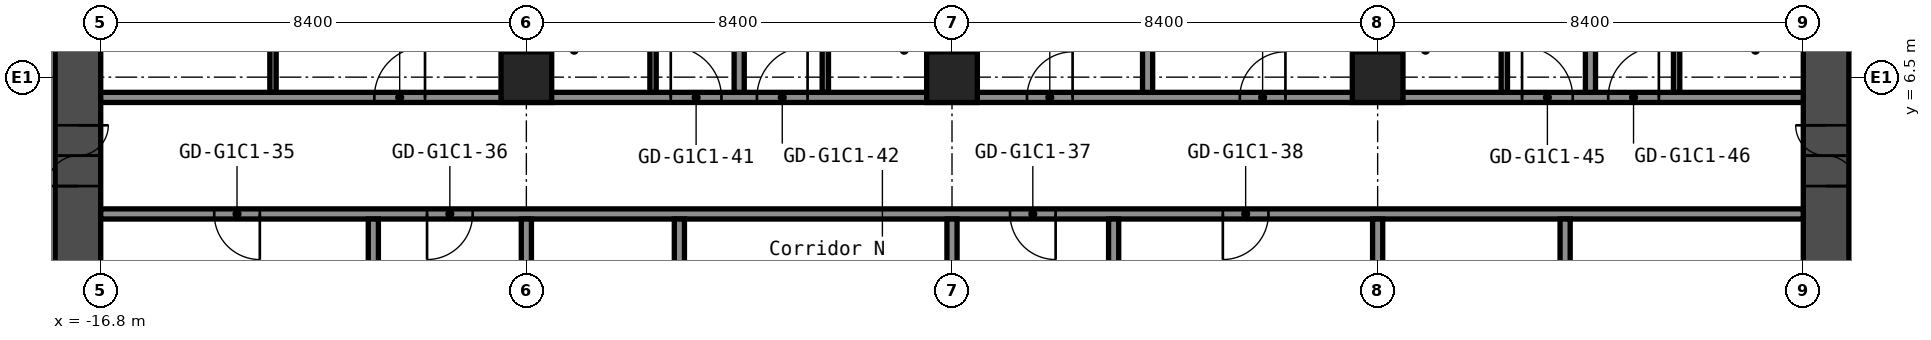
"""IFC4 building model, lengths in metres.
Left out: names, types, materials, properties, quantities, classifications, styles, units other than length and angle.
Written with IfcOpenShell. Run it as: python <this file> out.ifc"""

import sys

from ifc_helpers import new_model, si_unit, direction, frame, frame_2d, origin, origin_2d, place, context, subcontext, project, spatial, rectangle, hollow_rectangle, extrude, element, fill, save


model = new_model("IFC4")
c1 = context("Model", 3, precision=1e-05, world=origin(), true_north=direction((0.0, 1.0)))
c2 = subcontext(c1, "Body", "Model", "MODEL_VIEW")
j1 = project(units=[si_unit("LENGTHUNIT", "METRE"), si_unit("PLANEANGLEUNIT", "RADIAN")], contexts=[c1])
p1 = place(None, origin())
s1 = spatial("IfcSite", under=j1, at=p1, CompositionType="ELEMENT")
p2 = place(p1, origin())
s2 = spatial("IfcBuilding", under=s1, at=p2, CompositionType="ELEMENT")
p3 = place(p2, frame((0.0, 0.0, 42.2)))
s3 = spatial("IfcBuildingStorey", under=s2, at=p3, CompositionType="ELEMENT", Elevation=42.2)
for number, where, z_axis, x_axis in (
    (1, (-8.4, 6.5, 0.0), (0.0, 0.0, 1.0), (1.0, 0.0, 0.0)),
    (2, (0.0, 6.5, 0.0), (0.0, 0.0, 1.0), (1.0, 0.0, 0.0)),
    (3, (8.4, 6.5, 0.0), (0.0, 0.0, 1.0), (1.0, 0.0, 0.0)),
):
    element("IfcColumn", number, at=place(p3, frame(where, z_axis=z_axis, x_axis=x_axis)), inside=s3, PredefinedType="COLUMN", context=c2, shape_type="SweptSolid", body=[
        extrude(hollow_rectangle(XDim=1.0, YDim=1.0, WallThickness=0.04, at=origin_2d()), origin(), (0.0, 0.0, 1.0), 2.8),
    ])
p4 = place(p3, frame((-17.25, -8.4, 0.0), z_axis=(0.0, 0.0, 1.0), x_axis=(0.0, 1.0, 0.0)))
e4 = element("IfcWall", 4, at=p4, inside=s3, PredefinedType="SHEAR", context=c2, shape_type="SweptSolid", body=[
    extrude(rectangle(XDim=16.8, YDim=0.9, at=frame_2d((8.4, 0.0))), origin(), (0.0, 0.0, 1.0), 2.8),
])
p5 = place(p4, frame((12.75, 0.0, 0.0)))
e5 = element("IfcOpeningElement", 5, at=p5, cuts=e4, PredefinedType="OPENING", context=c2, shape_type="SweptSolid", body=[
    extrude(rectangle(XDim=1.2, YDim=2.1, at=frame_2d((0.6, 1.05))), frame((0.0, 0.46, 0.0), z_axis=(0.0, -1.0, 0.0), x_axis=(1.0, 0.0, 0.0)), (0.0, 0.0, 1.0), 0.92),
])
p6 = place(p4, frame((2.85, 0.0, 0.0)))
e6 = element("IfcOpeningElement", 6, at=p6, cuts=e4, PredefinedType="OPENING", context=c2, shape_type="SweptSolid", body=[
    extrude(rectangle(XDim=1.2, YDim=2.1, at=frame_2d((0.6, 1.05))), frame((0.0, 0.46, 0.0), z_axis=(0.0, -1.0, 0.0), x_axis=(1.0, 0.0, 0.0)), (0.0, 0.0, 1.0), 0.92),
])
p7 = place(p3, frame((17.25, -8.4, 0.0), z_axis=(0.0, 0.0, 1.0), x_axis=(0.0, 1.0, 0.0)))
e7 = element("IfcWall", 7, at=p7, inside=s3, PredefinedType="SHEAR", context=c2, shape_type="SweptSolid", body=[
    extrude(rectangle(XDim=16.8, YDim=0.9, at=frame_2d((8.4, 0.0))), origin(), (0.0, 0.0, 1.0), 2.8),
])
p8 = place(p7, frame((12.75, 0.0, 0.0)))
e8 = element("IfcOpeningElement", 8, at=p8, cuts=e7, PredefinedType="OPENING", context=c2, shape_type="SweptSolid", body=[
    extrude(rectangle(XDim=1.2, YDim=2.1, at=frame_2d((0.6, 1.05))), frame((0.0, 0.46, 0.0), z_axis=(0.0, -1.0, 0.0), x_axis=(1.0, 0.0, 0.0)), (0.0, 0.0, 1.0), 0.92),
])
p9 = place(p7, frame((2.85, 0.0, 0.0)))
e9 = element("IfcOpeningElement", 9, at=p9, cuts=e7, PredefinedType="OPENING", context=c2, shape_type="SweptSolid", body=[
    extrude(rectangle(XDim=1.2, YDim=2.1, at=frame_2d((0.6, 1.05))), frame((0.0, 0.46, 0.0), z_axis=(0.0, -1.0, 0.0), x_axis=(1.0, 0.0, 0.0)), (0.0, 0.0, 1.0), 0.92),
])
p10 = place(p3, frame((-16.8, 3.8, 0.0), z_axis=(0.0, 0.0, 1.0), x_axis=(1.0, 0.0, 0.0)))
e10 = element("IfcWall", 10, at=p10, inside=s3, PredefinedType="PARTITIONING", context=c2, shape_type="SweptSolid", body=[
    extrude(rectangle(XDim=33.6, YDim=0.2, at=frame_2d((16.8, 0.0))), origin(), (0.0, 0.0, 1.0), 2.8),
])
p11 = place(p10, frame((2.24, 0.0, 0.0)))
e11 = element("IfcOpeningElement", 11, at=p11, cuts=e10, PredefinedType="OPENING", context=c2, shape_type="SweptSolid", body=[
    extrude(rectangle(XDim=0.9, YDim=2.1, at=frame_2d((0.45, 1.05))), frame((0.0, 0.11, 0.0), z_axis=(0.0, -1.0, 0.0), x_axis=(1.0, 0.0, 0.0)), (0.0, 0.0, 1.0), 0.22),
])
p12 = place(p10, frame((6.44, 0.0, 0.0)))
e12 = element("IfcOpeningElement", 12, at=p12, cuts=e10, PredefinedType="OPENING", context=c2, shape_type="SweptSolid", body=[
    extrude(rectangle(XDim=0.9, YDim=2.1, at=frame_2d((0.45, 1.05))), frame((0.0, 0.11, 0.0), z_axis=(0.0, -1.0, 0.0), x_axis=(1.0, 0.0, 0.0)), (0.0, 0.0, 1.0), 0.22),
])
p13 = place(p10, frame((17.945, 0.0, 0.0)))
e13 = element("IfcOpeningElement", 13, at=p13, cuts=e10, PredefinedType="OPENING", context=c2, shape_type="SweptSolid", body=[
    extrude(rectangle(XDim=0.9, YDim=2.1, at=frame_2d((0.45, 1.05))), frame((0.0, 0.11, 0.0), z_axis=(0.0, -1.0, 0.0), x_axis=(1.0, 0.0, 0.0)), (0.0, 0.0, 1.0), 0.22),
])
p14 = place(p10, frame((22.145, 0.0, 0.0)))
e14 = element("IfcOpeningElement", 14, at=p14, cuts=e10, PredefinedType="OPENING", context=c2, shape_type="SweptSolid", body=[
    extrude(rectangle(XDim=0.9, YDim=2.1, at=frame_2d((0.45, 1.05))), frame((0.0, 0.11, 0.0), z_axis=(0.0, -1.0, 0.0), x_axis=(1.0, 0.0, 0.0)), (0.0, 0.0, 1.0), 0.22),
])
p15 = place(p3, frame((-16.8, 6.1, 0.0), z_axis=(0.0, 0.0, 1.0), x_axis=(1.0, 0.0, 0.0)))
e15 = element("IfcWall", 15, at=p15, inside=s3, PredefinedType="PARTITIONING", context=c2, shape_type="SweptSolid", body=[
    extrude(rectangle(XDim=33.6, YDim=0.2, at=frame_2d((16.8, 0.0))), origin(), (0.0, 0.0, 1.0), 2.8),
])
p16 = place(p15, frame((5.4, 0.0, 0.0)))
e16 = element("IfcOpeningElement", 16, at=p16, cuts=e15, PredefinedType="OPENING", context=c2, shape_type="SweptSolid", body=[
    extrude(rectangle(XDim=1.0, YDim=2.1, at=frame_2d((0.5, 1.05))), frame((0.0, 0.11, 0.0), z_axis=(0.0, -1.0, 0.0), x_axis=(1.0, 0.0, 0.0)), (0.0, 0.0, 1.0), 0.22),
])
p17 = place(p15, frame((11.25, 0.0, 0.0)))
e17 = element("IfcOpeningElement", 17, at=p17, cuts=e15, PredefinedType="OPENING", context=c2, shape_type="SweptSolid", body=[
    extrude(rectangle(XDim=1.0, YDim=2.1, at=frame_2d((0.5, 1.05))), frame((0.0, 0.11, 0.0), z_axis=(0.0, -1.0, 0.0), x_axis=(1.0, 0.0, 0.0)), (0.0, 0.0, 1.0), 0.22),
])
p18 = place(p15, frame((12.95, 0.0, 0.0)))
e18 = element("IfcOpeningElement", 18, at=p18, cuts=e15, PredefinedType="OPENING", context=c2, shape_type="SweptSolid", body=[
    extrude(rectangle(XDim=1.0, YDim=2.1, at=frame_2d((0.5, 1.05))), frame((0.0, 0.11, 0.0), z_axis=(0.0, -1.0, 0.0), x_axis=(1.0, 0.0, 0.0)), (0.0, 0.0, 1.0), 0.22),
])
p19 = place(p15, frame((18.28, 0.0, 0.0)))
e19 = element("IfcOpeningElement", 19, at=p19, cuts=e15, PredefinedType="OPENING", context=c2, shape_type="SweptSolid", body=[
    extrude(rectangle(XDim=0.9, YDim=2.1, at=frame_2d((0.45, 1.05))), frame((0.0, 0.11, 0.0), z_axis=(0.0, -1.0, 0.0), x_axis=(1.0, 0.0, 0.0)), (0.0, 0.0, 1.0), 0.22),
])
p20 = place(p15, frame((22.48, 0.0, 0.0)))
e20 = element("IfcOpeningElement", 20, at=p20, cuts=e15, PredefinedType="OPENING", context=c2, shape_type="SweptSolid", body=[
    extrude(rectangle(XDim=0.9, YDim=2.1, at=frame_2d((0.45, 1.05))), frame((0.0, 0.11, 0.0), z_axis=(0.0, -1.0, 0.0), x_axis=(1.0, 0.0, 0.0)), (0.0, 0.0, 1.0), 0.22),
])
p21 = place(p15, frame((28.05, 0.0, 0.0)))
e21 = element("IfcOpeningElement", 21, at=p21, cuts=e15, PredefinedType="OPENING", context=c2, shape_type="SweptSolid", body=[
    extrude(rectangle(XDim=1.0, YDim=2.1, at=frame_2d((0.5, 1.05))), frame((0.0, 0.11, 0.0), z_axis=(0.0, -1.0, 0.0), x_axis=(1.0, 0.0, 0.0)), (0.0, 0.0, 1.0), 0.22),
])
p22 = place(p15, frame((29.75, 0.0, 0.0)))
e22 = element("IfcOpeningElement", 22, at=p22, cuts=e15, PredefinedType="OPENING", context=c2, shape_type="SweptSolid", body=[
    extrude(rectangle(XDim=1.0, YDim=2.1, at=frame_2d((0.5, 1.05))), frame((0.0, 0.11, 0.0), z_axis=(0.0, -1.0, 0.0), x_axis=(1.0, 0.0, 0.0)), (0.0, 0.0, 1.0), 0.22),
])
p23 = place(p3, frame((-13.4, 6.2, 0.0), z_axis=(0.0, 0.0, 1.0), x_axis=(0.0, 1.0, 0.0)))
e23 = element("IfcWall", 23, at=p23, inside=s3, PredefinedType="PARTITIONING", context=c2, shape_type="SweptSolid", body=[
    extrude(rectangle(XDim=3.3, YDim=0.125, at=frame_2d((1.65, 0.0))), origin(), (0.0, 0.0, 1.0), 2.8),
])
for number, where, z_axis, x_axis in (
    (24, (-11.42, -3.7, 0.0), (0.0, 0.0, 1.0), (0.0, 1.0, 0.0)),
    (25, (-8.4, -3.7, 0.0), (0.0, 0.0, 1.0), (0.0, 1.0, 0.0)),
):
    element("IfcWall", number, at=place(p3, frame(where, z_axis=z_axis, x_axis=x_axis)), inside=s3, PredefinedType="PARTITIONING", context=c2, shape_type="SweptSolid", body=[
        extrude(rectangle(XDim=7.4, YDim=0.2, at=frame_2d((3.7, 0.0))), origin(), (0.0, 0.0, 1.0), 2.8),
    ])
p24 = place(p3, frame((-8.4, 6.99, 0.0), z_axis=(0.0, 0.0, 1.0), x_axis=(0.0, 1.0, 0.0)))
e26 = element("IfcWall", 26, at=p24, inside=s3, PredefinedType="PARTITIONING", context=c2, shape_type="SweptSolid", body=[
    extrude(rectangle(XDim=13.31, YDim=0.2, at=frame_2d((6.655, 0.0))), origin(), (0.0, 0.0, 1.0), 2.8),
])
p25 = place(p3, frame((-5.9, 6.2, 0.0), z_axis=(0.0, 0.0, 1.0), x_axis=(0.0, 1.0, 0.0)))
e27 = element("IfcWall", 27, at=p25, inside=s3, PredefinedType="PARTITIONING", context=c2, shape_type="SweptSolid", body=[
    extrude(rectangle(XDim=2.9, YDim=0.125, at=frame_2d((1.45, 0.0))), origin(), (0.0, 0.0, 1.0), 2.8),
])
p26 = place(p25, frame((1.5, 0.0, 0.0)))
e28 = element("IfcOpeningElement", 28, at=p26, cuts=e27, PredefinedType="OPENING", context=c2, shape_type="SweptSolid", body=[
    extrude(rectangle(XDim=0.8, YDim=2.1, at=frame_2d((0.4, 1.05))), frame((0.0, 0.073, 0.0), z_axis=(0.0, -1.0, 0.0), x_axis=(1.0, 0.0, 0.0)), (0.0, 0.0, 1.0), 0.145),
])
p27 = place(p3, frame((-5.38, -3.7, 0.0), z_axis=(0.0, 0.0, 1.0), x_axis=(0.0, 1.0, 0.0)))
e29 = element("IfcWall", 29, at=p27, inside=s3, PredefinedType="PARTITIONING", context=c2, shape_type="SweptSolid", body=[
    extrude(rectangle(XDim=7.4, YDim=0.2, at=frame_2d((3.7, 0.0))), origin(), (0.0, 0.0, 1.0), 2.8),
])
p28 = place(p3, frame((-4.2, 6.2, 0.0), z_axis=(0.0, 0.0, 1.0), x_axis=(0.0, 1.0, 0.0)))
e30 = element("IfcWall", 30, at=p28, inside=s3, PredefinedType="PARTITIONING", context=c2, shape_type="SweptSolid", body=[
    extrude(rectangle(XDim=14.1, YDim=0.2, at=frame_2d((7.05, 0.0))), origin(), (0.0, 0.0, 1.0), 2.8),
])
p29 = place(p3, frame((-2.5, 6.2, 0.0), z_axis=(0.0, 0.0, 1.0), x_axis=(0.0, 1.0, 0.0)))
e31 = element("IfcWall", 31, at=p29, inside=s3, PredefinedType="PARTITIONING", context=c2, shape_type="SweptSolid", body=[
    extrude(rectangle(XDim=2.9, YDim=0.125, at=frame_2d((1.45, 0.0))), origin(), (0.0, 0.0, 1.0), 2.8),
])
p30 = place(p29, frame((1.5, 0.0, 0.0)))
e32 = element("IfcOpeningElement", 32, at=p30, cuts=e31, PredefinedType="OPENING", context=c2, shape_type="SweptSolid", body=[
    extrude(rectangle(XDim=0.8, YDim=2.1, at=frame_2d((0.4, 1.05))), frame((0.0, 0.073, 0.0), z_axis=(0.0, -1.0, 0.0), x_axis=(1.0, 0.0, 0.0)), (0.0, 0.0, 1.0), 0.145),
])
p31 = place(p3, frame((0.0, -3.7, 0.0), z_axis=(0.0, 0.0, 1.0), x_axis=(0.0, 1.0, 0.0)))
e33 = element("IfcWall", 33, at=p31, inside=s3, PredefinedType="PARTITIONING", context=c2, shape_type="SweptSolid", body=[
    extrude(rectangle(XDim=7.4, YDim=0.2, at=frame_2d((3.7, 0.0))), origin(), (0.0, 0.0, 1.0), 2.8),
])
p32 = place(p3, frame((0.0, 6.99, 0.0), z_axis=(0.0, 0.0, 1.0), x_axis=(0.0, 1.0, 0.0)))
e34 = element("IfcWall", 34, at=p32, inside=s3, PredefinedType="PARTITIONING", context=c2, shape_type="SweptSolid", body=[
    extrude(rectangle(XDim=13.31, YDim=0.2, at=frame_2d((6.655, 0.0))), origin(), (0.0, 0.0, 1.0), 2.8),
])
p33 = place(p3, frame((3.19, -3.7, 0.0), z_axis=(0.0, 0.0, 1.0), x_axis=(0.0, 1.0, 0.0)))
e35 = element("IfcWall", 35, at=p33, inside=s3, PredefinedType="PARTITIONING", context=c2, shape_type="SweptSolid", body=[
    extrude(rectangle(XDim=7.4, YDim=0.2, at=frame_2d((3.7, 0.0))), origin(), (0.0, 0.0, 1.0), 2.8),
])
p34 = place(p3, frame((3.86, 6.2, 0.0), z_axis=(0.0, 0.0, 1.0), x_axis=(0.0, 1.0, 0.0)))
e36 = element("IfcWall", 36, at=p34, inside=s3, PredefinedType="PARTITIONING", context=c2, shape_type="SweptSolid", body=[
    extrude(rectangle(XDim=14.1, YDim=0.2, at=frame_2d((7.05, 0.0))), origin(), (0.0, 0.0, 1.0), 2.8),
])
p35 = place(p3, frame((8.4, -3.7, 0.0), z_axis=(0.0, 0.0, 1.0), x_axis=(0.0, 1.0, 0.0)))
e37 = element("IfcWall", 37, at=p35, inside=s3, PredefinedType="PARTITIONING", context=c2, shape_type="SweptSolid", body=[
    extrude(rectangle(XDim=7.4, YDim=0.2, at=frame_2d((3.7, 0.0))), origin(), (0.0, 0.0, 1.0), 2.8),
])
p36 = place(p3, frame((8.4, 6.99, 0.0), z_axis=(0.0, 0.0, 1.0), x_axis=(0.0, 1.0, 0.0)))
e38 = element("IfcWall", 38, at=p36, inside=s3, PredefinedType="PARTITIONING", context=c2, shape_type="SweptSolid", body=[
    extrude(rectangle(XDim=13.31, YDim=0.2, at=frame_2d((6.655, 0.0))), origin(), (0.0, 0.0, 1.0), 2.8),
])
p37 = place(p3, frame((10.9, 6.2, 0.0), z_axis=(0.0, 0.0, 1.0), x_axis=(0.0, 1.0, 0.0)))
e39 = element("IfcWall", 39, at=p37, inside=s3, PredefinedType="PARTITIONING", context=c2, shape_type="SweptSolid", body=[
    extrude(rectangle(XDim=2.9, YDim=0.125, at=frame_2d((1.45, 0.0))), origin(), (0.0, 0.0, 1.0), 2.8),
])
p38 = place(p37, frame((1.5, 0.0, 0.0)))
e40 = element("IfcOpeningElement", 40, at=p38, cuts=e39, PredefinedType="OPENING", context=c2, shape_type="SweptSolid", body=[
    extrude(rectangle(XDim=0.8, YDim=2.1, at=frame_2d((0.4, 1.05))), frame((0.0, 0.073, 0.0), z_axis=(0.0, -1.0, 0.0), x_axis=(1.0, 0.0, 0.0)), (0.0, 0.0, 1.0), 0.145),
])
p39 = place(p3, frame((12.1, -3.7, 0.0), z_axis=(0.0, 0.0, 1.0), x_axis=(0.0, 1.0, 0.0)))
e41 = element("IfcWall", 41, at=p39, inside=s3, PredefinedType="PARTITIONING", context=c2, shape_type="SweptSolid", body=[
    extrude(rectangle(XDim=7.4, YDim=0.2, at=frame_2d((3.7, 0.0))), origin(), (0.0, 0.0, 1.0), 2.8),
])
p40 = place(p3, frame((12.6, 6.2, 0.0), z_axis=(0.0, 0.0, 1.0), x_axis=(0.0, 1.0, 0.0)))
e42 = element("IfcWall", 42, at=p40, inside=s3, PredefinedType="PARTITIONING", context=c2, shape_type="SweptSolid", body=[
    extrude(rectangle(XDim=14.1, YDim=0.2, at=frame_2d((7.05, 0.0))), origin(), (0.0, 0.0, 1.0), 2.8),
])
p41 = place(p3, frame((14.3, 6.2, 0.0), z_axis=(0.0, 0.0, 1.0), x_axis=(0.0, 1.0, 0.0)))
e43 = element("IfcWall", 43, at=p41, inside=s3, PredefinedType="PARTITIONING", context=c2, shape_type="SweptSolid", body=[
    extrude(rectangle(XDim=2.9, YDim=0.125, at=frame_2d((1.45, 0.0))), origin(), (0.0, 0.0, 1.0), 2.8),
])
p42 = place(p41, frame((1.5, 0.0, 0.0)))
e44 = element("IfcOpeningElement", 44, at=p42, cuts=e43, PredefinedType="OPENING", context=c2, shape_type="SweptSolid", body=[
    extrude(rectangle(XDim=0.8, YDim=2.1, at=frame_2d((0.4, 1.05))), frame((0.0, 0.073, 0.0), z_axis=(0.0, -1.0, 0.0), x_axis=(1.0, 0.0, 0.0)), (0.0, 0.0, 1.0), 0.145),
])
p43 = place(p5, origin())
e45 = element("IfcDoor", 45, at=p43, inside=s3, OperationType="DOUBLE_DOOR_SINGLE_SWING", PredefinedType="DOOR", context=c2, shape_type="SweptSolid", body=[
    extrude(rectangle(XDim=1.2, YDim=2.1, at=frame_2d((0.6, 1.05))), frame((0.0, 0.025, 0.0), z_axis=(0.0, -1.0, 0.0), x_axis=(1.0, 0.0, 0.0)), (0.0, 0.0, 1.0), 0.05),
])
fill(e5, e45)
p44 = place(p8, origin())
e46 = element("IfcDoor", 46, at=p44, inside=s3, OperationType="DOUBLE_DOOR_SINGLE_SWING", PredefinedType="DOOR", context=c2, shape_type="SweptSolid", body=[
    extrude(rectangle(XDim=1.2, YDim=2.1, at=frame_2d((0.6, 1.05))), frame((0.0, 0.025, 0.0), z_axis=(0.0, -1.0, 0.0), x_axis=(1.0, 0.0, 0.0)), (0.0, 0.0, 1.0), 0.05),
])
fill(e8, e46)
p45 = place(p11, origin())
e47 = element("IfcDoor", 47, at=p45, inside=s3, OperationType="SINGLE_SWING_RIGHT", PredefinedType="DOOR", context=c2, shape_type="SweptSolid", body=[
    extrude(rectangle(XDim=0.9, YDim=2.1, at=frame_2d((0.45, 1.05))), frame((0.0, 0.025, 0.0), z_axis=(0.0, -1.0, 0.0), x_axis=(1.0, 0.0, 0.0)), (0.0, 0.0, 1.0), 0.05),
])
fill(e11, e47)
p46 = place(p12, origin())
e48 = element("IfcDoor", 48, at=p46, inside=s3, OperationType="SINGLE_SWING_LEFT", PredefinedType="DOOR", context=c2, shape_type="SweptSolid", body=[
    extrude(rectangle(XDim=0.9, YDim=2.1, at=frame_2d((0.45, 1.05))), frame((0.0, 0.025, 0.0), z_axis=(0.0, -1.0, 0.0), x_axis=(1.0, 0.0, 0.0)), (0.0, 0.0, 1.0), 0.05),
])
fill(e12, e48)
p47 = place(p13, origin())
e49 = element("IfcDoor", 49, at=p47, inside=s3, OperationType="SINGLE_SWING_RIGHT", PredefinedType="DOOR", context=c2, shape_type="SweptSolid", body=[
    extrude(rectangle(XDim=0.9, YDim=2.1, at=frame_2d((0.45, 1.05))), frame((0.0, 0.025, 0.0), z_axis=(0.0, -1.0, 0.0), x_axis=(1.0, 0.0, 0.0)), (0.0, 0.0, 1.0), 0.05),
])
fill(e13, e49)
p48 = place(p14, origin())
e50 = element("IfcDoor", 50, at=p48, inside=s3, OperationType="SINGLE_SWING_LEFT", PredefinedType="DOOR", context=c2, shape_type="SweptSolid", body=[
    extrude(rectangle(XDim=0.9, YDim=2.1, at=frame_2d((0.45, 1.05))), frame((0.0, 0.025, 0.0), z_axis=(0.0, -1.0, 0.0), x_axis=(1.0, 0.0, 0.0)), (0.0, 0.0, 1.0), 0.05),
])
fill(e14, e50)
p49 = place(p16, origin())
e51 = element("IfcDoor", 51, at=p49, inside=s3, OperationType="SINGLE_SWING_LEFT", PredefinedType="DOOR", context=c2, shape_type="SweptSolid", body=[
    extrude(rectangle(XDim=1.0, YDim=2.1, at=frame_2d((0.5, 1.05))), frame((0.0, 0.025, 0.0), z_axis=(0.0, -1.0, 0.0), x_axis=(1.0, 0.0, 0.0)), (0.0, 0.0, 1.0), 0.05),
])
fill(e16, e51)
p50 = place(p17, origin())
e52 = element("IfcDoor", 52, at=p50, inside=s3, OperationType="SINGLE_SWING_RIGHT", PredefinedType="DOOR", context=c2, shape_type="SweptSolid", body=[
    extrude(rectangle(XDim=1.0, YDim=2.1, at=frame_2d((0.5, 1.05))), frame((0.0, 0.025, 0.0), z_axis=(0.0, -1.0, 0.0), x_axis=(1.0, 0.0, 0.0)), (0.0, 0.0, 1.0), 0.05),
])
fill(e17, e52)
p51 = place(p18, origin())
e53 = element("IfcDoor", 53, at=p51, inside=s3, OperationType="SINGLE_SWING_LEFT", PredefinedType="DOOR", context=c2, shape_type="SweptSolid", body=[
    extrude(rectangle(XDim=1.0, YDim=2.1, at=frame_2d((0.5, 1.05))), frame((0.0, 0.025, 0.0), z_axis=(0.0, -1.0, 0.0), x_axis=(1.0, 0.0, 0.0)), (0.0, 0.0, 1.0), 0.05),
])
fill(e18, e53)
p52 = place(p19, origin())
e54 = element("IfcDoor", 54, at=p52, inside=s3, OperationType="SINGLE_SWING_LEFT", PredefinedType="DOOR", context=c2, shape_type="SweptSolid", body=[
    extrude(rectangle(XDim=0.9, YDim=2.1, at=frame_2d((0.45, 1.05))), frame((0.0, 0.025, 0.0), z_axis=(0.0, -1.0, 0.0), x_axis=(1.0, 0.0, 0.0)), (0.0, 0.0, 1.0), 0.05),
])
fill(e19, e54)
p53 = place(p20, origin())
e55 = element("IfcDoor", 55, at=p53, inside=s3, OperationType="SINGLE_SWING_LEFT", PredefinedType="DOOR", context=c2, shape_type="SweptSolid", body=[
    extrude(rectangle(XDim=0.9, YDim=2.1, at=frame_2d((0.45, 1.05))), frame((0.0, 0.025, 0.0), z_axis=(0.0, -1.0, 0.0), x_axis=(1.0, 0.0, 0.0)), (0.0, 0.0, 1.0), 0.05),
])
fill(e20, e55)
p54 = place(p21, origin())
e56 = element("IfcDoor", 56, at=p54, inside=s3, OperationType="SINGLE_SWING_RIGHT", PredefinedType="DOOR", context=c2, shape_type="SweptSolid", body=[
    extrude(rectangle(XDim=1.0, YDim=2.1, at=frame_2d((0.5, 1.05))), frame((0.0, 0.025, 0.0), z_axis=(0.0, -1.0, 0.0), x_axis=(1.0, 0.0, 0.0)), (0.0, 0.0, 1.0), 0.05),
])
fill(e21, e56)
p55 = place(p22, origin())
e57 = element("IfcDoor", 57, at=p55, inside=s3, OperationType="SINGLE_SWING_LEFT", PredefinedType="DOOR", context=c2, shape_type="SweptSolid", body=[
    extrude(rectangle(XDim=1.0, YDim=2.1, at=frame_2d((0.5, 1.05))), frame((0.0, 0.025, 0.0), z_axis=(0.0, -1.0, 0.0), x_axis=(1.0, 0.0, 0.0)), (0.0, 0.0, 1.0), 0.05),
])
fill(e22, e57)
save(model, sys.argv[1])
